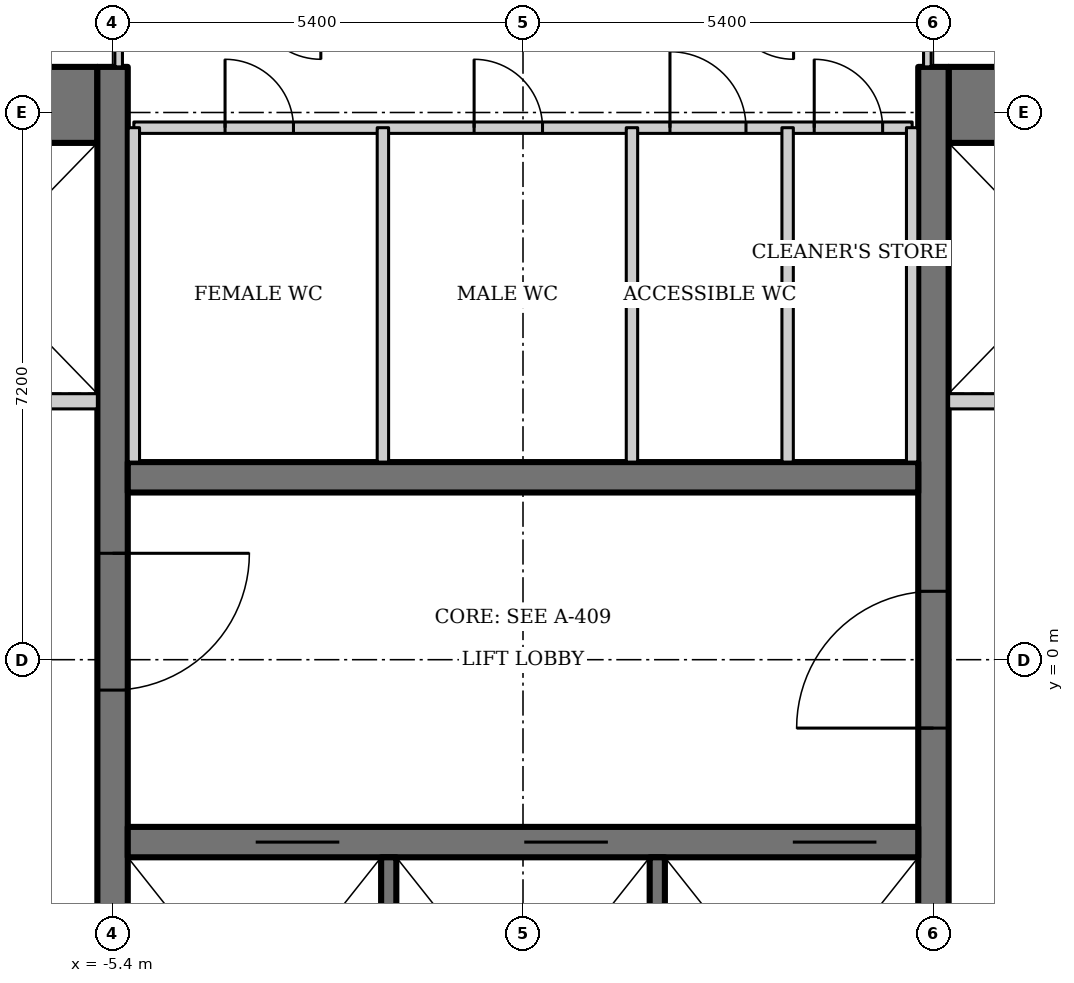
"""IFC4 building model, lengths in metres.
Left out: names, types, materials, properties, quantities, classifications, styles, units other than length and angle.
Written with IfcOpenShell. Run it as: python <this file> out.ifc"""

import sys

from ifc_helpers import new_model, si_unit, direction, frame, frame_2d, origin, place, context, subcontext, project, spatial, rectangle, extrude, element, fill, save


model = new_model("IFC4")
c1 = context("Model", 3, precision=1e-05, world=origin(), true_north=direction((0.0, 1.0)))
c2 = subcontext(c1, "Body", "Model", "MODEL_VIEW")
j1 = project(units=[si_unit("LENGTHUNIT", "METRE"), si_unit("PLANEANGLEUNIT", "RADIAN")], contexts=[c1])
p1 = place(None, origin())
s1 = spatial("IfcSite", under=j1, at=p1, CompositionType="ELEMENT")
p2 = place(p1, origin())
s2 = spatial("IfcBuilding", under=s1, at=p2, CompositionType="ELEMENT")
p3 = place(p2, frame((0.0, 0.0, 262.0)))
s3 = spatial("IfcBuildingStorey", under=s2, at=p3, CompositionType="ELEMENT", Elevation=262.0)
for number, where, z_axis, x_axis in (
    (1, (12.2, 7.3, 0.0), (0.0, 0.0, 1.0), (-1.0, 0.0, 0.0)),
    (2, (-5.6, 7.3, 0.0), (0.0, 0.0, 1.0), (-1.0, 0.0, 0.0)),
):
    element("IfcWall", number, at=place(p3, frame(where, z_axis=z_axis, x_axis=x_axis)), inside=s3, PredefinedType="SHEAR", context=c2, shape_type="SweptSolid", body=[
        extrude(rectangle(XDim=6.6, YDim=1.0, at=frame_2d((3.3, 0.0))), origin(), (0.0, 0.0, 1.0), 4.2),
    ])
p4 = place(p3, frame((5.4, -6.8, 0.0), z_axis=(0.0, 0.0, 1.0), x_axis=(0.0, 1.0, 0.0)))
e3 = element("IfcWall", 3, at=p4, inside=s3, PredefinedType="SHEAR", context=c2, shape_type="SweptSolid", body=[
    extrude(rectangle(XDim=14.6, YDim=0.4, at=frame_2d((7.3, 0.0))), origin(), (0.0, 0.0, 1.0), 4.2),
])
p5 = place(p4, frame((5.9, 0.0, 0.0)))
e4 = element("IfcOpeningElement", 4, at=p5, cuts=e3, PredefinedType="OPENING", context=c2, shape_type="SweptSolid", body=[
    extrude(rectangle(XDim=1.8, YDim=2.1, at=frame_2d((0.9, 1.05))), frame((0.0, 0.21, 0.0), z_axis=(0.0, -1.0, 0.0), x_axis=(1.0, 0.0, 0.0)), (0.0, 0.0, 1.0), 0.42),
])
p6 = place(p3, frame((-5.4, 7.8, 0.0), z_axis=(0.0, 0.0, 1.0), x_axis=(0.0, -1.0, 0.0)))
e5 = element("IfcWall", 5, at=p6, inside=s3, PredefinedType="SHEAR", context=c2, shape_type="SweptSolid", body=[
    extrude(rectangle(XDim=14.6, YDim=0.4, at=frame_2d((7.3, 0.0))), origin(), (0.0, 0.0, 1.0), 4.2),
])
p7 = place(p6, frame((6.4, 0.0, 0.0)))
e6 = element("IfcOpeningElement", 6, at=p7, cuts=e5, PredefinedType="OPENING", context=c2, shape_type="SweptSolid", body=[
    extrude(rectangle(XDim=1.8, YDim=2.1, at=frame_2d((0.9, 1.05))), frame((0.0, 0.21, 0.0), z_axis=(0.0, -1.0, 0.0), x_axis=(1.0, 0.0, 0.0)), (0.0, 0.0, 1.0), 0.42),
])
p8 = place(p3, frame((-5.2, -2.4, 0.0), z_axis=(0.0, 0.0, 1.0), x_axis=(1.0, 0.0, 0.0)))
e7 = element("IfcWall", 7, at=p8, inside=s3, PredefinedType="SHEAR", context=c2, shape_type="SweptSolid", body=[
    extrude(rectangle(XDim=10.4, YDim=0.4, at=frame_2d((5.2, 0.0))), origin(), (0.0, 0.0, 1.0), 4.2),
])
p9 = place(p8, frame((1.683, 0.0, 0.0)))
e8 = element("IfcOpeningElement", 8, at=p9, cuts=e7, PredefinedType="OPENING", context=c2, shape_type="SweptSolid", body=[
    extrude(rectangle(XDim=1.1, YDim=2.2, at=frame_2d((0.55, 1.1))), frame((0.0, 0.21, 0.0), z_axis=(0.0, -1.0, 0.0), x_axis=(1.0, 0.0, 0.0)), (0.0, 0.0, 1.0), 0.42),
])
p10 = place(p8, frame((5.217, 0.0, 0.0)))
e9 = element("IfcOpeningElement", 9, at=p10, cuts=e7, PredefinedType="OPENING", context=c2, shape_type="SweptSolid", body=[
    extrude(rectangle(XDim=1.1, YDim=2.2, at=frame_2d((0.55, 1.1))), frame((0.0, 0.21, 0.0), z_axis=(0.0, -1.0, 0.0), x_axis=(1.0, 0.0, 0.0)), (0.0, 0.0, 1.0), 0.42),
])
p11 = place(p8, frame((8.75, 0.0, 0.0)))
e10 = element("IfcOpeningElement", 10, at=p11, cuts=e7, PredefinedType="OPENING", context=c2, shape_type="SweptSolid", body=[
    extrude(rectangle(XDim=1.1, YDim=2.2, at=frame_2d((0.55, 1.1))), frame((0.0, 0.21, 0.0), z_axis=(0.0, -1.0, 0.0), x_axis=(1.0, 0.0, 0.0)), (0.0, 0.0, 1.0), 0.42),
])
for number, where, z_axis, x_axis in (
    (11, (-1.767, -2.6, 0.0), (0.0, 0.0, 1.0), (0.0, -1.0, 0.0)),
    (12, (1.767, -2.6, 0.0), (0.0, 0.0, 1.0), (0.0, -1.0, 0.0)),
):
    element("IfcWall", number, at=place(p3, frame(where, z_axis=z_axis, x_axis=x_axis)), inside=s3, PredefinedType="SOLIDWALL", context=c2, shape_type="SweptSolid", body=[
        extrude(rectangle(XDim=4.2, YDim=0.2, at=frame_2d((2.1, 0.0))), origin(), (0.0, 0.0, 1.0), 4.2),
    ])
p12 = place(p3, frame((5.2, 2.4, 0.0), z_axis=(0.0, 0.0, 1.0), x_axis=(-1.0, 0.0, 0.0)))
e13 = element("IfcWall", 13, at=p12, inside=s3, PredefinedType="SHEAR", context=c2, shape_type="SweptSolid", body=[
    extrude(rectangle(XDim=10.4, YDim=0.4, at=frame_2d((5.2, 0.0))), origin(), (0.0, 0.0, 1.0), 4.2),
])
p13 = place(p3, frame((12.2, 3.4, 0.0), z_axis=(0.0, 0.0, 1.0), x_axis=(-1.0, 0.0, 0.0)))
e14 = element("IfcWall", 14, at=p13, inside=s3, PredefinedType="SOLIDWALL", context=c2, shape_type="SweptSolid", body=[
    extrude(rectangle(XDim=6.6, YDim=0.2, at=frame_2d((3.3, 0.0))), origin(), (0.0, 0.0, 1.0), 4.2),
])
p14 = place(p13, frame((4.45, 0.0, 0.0)))
e15 = element("IfcOpeningElement", 15, at=p14, cuts=e14, PredefinedType="OPENING", context=c2, shape_type="SweptSolid", body=[
    extrude(rectangle(XDim=1.1, YDim=2.2, at=frame_2d((0.55, 1.1))), frame((0.0, 0.11, 0.0), z_axis=(0.0, -1.0, 0.0), x_axis=(1.0, 0.0, 0.0)), (0.0, 0.0, 1.0), 0.22),
])
p15 = place(p13, frame((0.9, 0.0, 0.0)))
e16 = element("IfcOpeningElement", 16, at=p15, cuts=e14, PredefinedType="OPENING", context=c2, shape_type="SweptSolid", body=[
    extrude(rectangle(XDim=1.4, YDim=2.2, at=frame_2d((0.7, 1.1))), frame((0.0, 0.11, 0.0), z_axis=(0.0, -1.0, 0.0), x_axis=(1.0, 0.0, 0.0)), (0.0, 0.0, 1.0), 0.22),
])
p16 = place(p3, frame((-12.2, 3.4, 0.0), z_axis=(0.0, 0.0, 1.0), x_axis=(1.0, 0.0, 0.0)))
e17 = element("IfcWall", 17, at=p16, inside=s3, PredefinedType="SOLIDWALL", context=c2, shape_type="SweptSolid", body=[
    extrude(rectangle(XDim=6.6, YDim=0.2, at=frame_2d((3.3, 0.0))), origin(), (0.0, 0.0, 1.0), 4.2),
])
p17 = place(p16, frame((1.05, 0.0, 0.0)))
e18 = element("IfcOpeningElement", 18, at=p17, cuts=e17, PredefinedType="OPENING", context=c2, shape_type="SweptSolid", body=[
    extrude(rectangle(XDim=1.1, YDim=2.2, at=frame_2d((0.55, 1.1))), frame((0.0, 0.11, 0.0), z_axis=(0.0, -1.0, 0.0), x_axis=(1.0, 0.0, 0.0)), (0.0, 0.0, 1.0), 0.22),
])
p18 = place(p16, frame((4.3, 0.0, 0.0)))
e19 = element("IfcOpeningElement", 19, at=p18, cuts=e17, PredefinedType="OPENING", context=c2, shape_type="SweptSolid", body=[
    extrude(rectangle(XDim=1.4, YDim=2.2, at=frame_2d((0.7, 1.1))), frame((0.0, 0.11, 0.0), z_axis=(0.0, -1.0, 0.0), x_axis=(1.0, 0.0, 0.0)), (0.0, 0.0, 1.0), 0.22),
])
p19 = place(p3, frame((-5.12, 7.0, 0.0), z_axis=(0.0, 0.0, 1.0), x_axis=(1.0, 0.0, 0.0)))
e20 = element("IfcWall", 20, at=p19, inside=s3, PredefinedType="SOLIDWALL", context=c2, shape_type="SweptSolid", body=[
    extrude(rectangle(XDim=10.24, YDim=0.15, at=frame_2d((5.12, 0.0))), origin(), (0.0, 0.0, 1.0), 4.05),
])
p20 = place(p19, frame((1.2, 0.0, 0.0)))
e21 = element("IfcOpeningElement", 21, at=p20, cuts=e20, PredefinedType="OPENING", context=c2, shape_type="SweptSolid", body=[
    extrude(rectangle(XDim=0.9, YDim=2.1, at=frame_2d((0.45, 1.05))), frame((0.0, 0.085, 0.0), z_axis=(0.0, -1.0, 0.0), x_axis=(1.0, 0.0, 0.0)), (0.0, 0.0, 1.0), 0.17),
])
p21 = place(p19, frame((4.477, 0.0, 0.0)))
e22 = element("IfcOpeningElement", 22, at=p21, cuts=e20, PredefinedType="OPENING", context=c2, shape_type="SweptSolid", body=[
    extrude(rectangle(XDim=0.9, YDim=2.1, at=frame_2d((0.45, 1.05))), frame((0.0, 0.085, 0.0), z_axis=(0.0, -1.0, 0.0), x_axis=(1.0, 0.0, 0.0)), (0.0, 0.0, 1.0), 0.17),
])
p22 = place(p19, frame((7.054, 0.0, 0.0)))
e23 = element("IfcOpeningElement", 23, at=p22, cuts=e20, PredefinedType="OPENING", context=c2, shape_type="SweptSolid", body=[
    extrude(rectangle(XDim=1.0, YDim=2.1, at=frame_2d((0.5, 1.05))), frame((0.0, 0.085, 0.0), z_axis=(0.0, -1.0, 0.0), x_axis=(1.0, 0.0, 0.0)), (0.0, 0.0, 1.0), 0.17),
])
p23 = place(p19, frame((8.952, 0.0, 0.0)))
e24 = element("IfcOpeningElement", 24, at=p23, cuts=e20, PredefinedType="OPENING", context=c2, shape_type="SweptSolid", body=[
    extrude(rectangle(XDim=0.9, YDim=2.1, at=frame_2d((0.45, 1.05))), frame((0.0, 0.085, 0.0), z_axis=(0.0, -1.0, 0.0), x_axis=(1.0, 0.0, 0.0)), (0.0, 0.0, 1.0), 0.17),
])
for number, where, z_axis, x_axis in (
    (25, (-5.12, 2.6, 0.0), (0.0, 0.0, 1.0), (0.0, 1.0, 0.0)),
    (26, (5.12, 2.6, 0.0), (0.0, 0.0, 1.0), (0.0, 1.0, 0.0)),
    (27, (-1.843, 2.6, 0.0), (0.0, 0.0, 1.0), (0.0, 1.0, 0.0)),
):
    element("IfcWall", number, at=place(p3, frame(where, z_axis=z_axis, x_axis=x_axis)), inside=s3, PredefinedType="SOLIDWALL", context=c2, shape_type="SweptSolid", body=[
        extrude(rectangle(XDim=4.4, YDim=0.15, at=frame_2d((2.2, 0.0))), origin(), (0.0, 0.0, 1.0), 4.05),
    ])
p24 = place(p3, frame((1.434, 2.6, 0.0), z_axis=(0.0, 0.0, 1.0), x_axis=(0.0, 1.0, 0.0)))
e28 = element("IfcWall", 28, at=p24, inside=s3, PredefinedType="SOLIDWALL", context=c2, shape_type="SweptSolid", body=[
    extrude(rectangle(XDim=4.4, YDim=0.15, at=frame_2d((2.2, 0.0))), origin(), (0.0, 0.0, 1.0), 3.108),
])
p25 = place(p3, frame((3.482, 2.6, 0.0), z_axis=(0.0, 0.0, 1.0), x_axis=(0.0, 1.0, 0.0)))
e29 = element("IfcWall", 29, at=p25, inside=s3, PredefinedType="SOLIDWALL", context=c2, shape_type="SweptSolid", body=[
    extrude(rectangle(XDim=4.4, YDim=0.15, at=frame_2d((2.2, 0.0))), origin(), (0.0, 0.0, 1.0), 4.05),
])
for number, where, z_axis, x_axis in (
    (30, (5.32, 7.8, 0.0), (0.0, 0.0, 1.0), (0.0, 1.0, 0.0)),
    (31, (-5.32, 8.8, 0.0), (0.0, 0.0, 1.0), (0.0, -1.0, 0.0)),
):
    element("IfcWall", number, at=place(p3, frame(where, z_axis=z_axis, x_axis=x_axis)), inside=s3, PredefinedType="PARTITIONING", context=c2, shape_type="SweptSolid", body=[
        extrude(rectangle(XDim=1.0, YDim=0.1, at=frame_2d((0.5, 0.0))), origin(), (0.0, 0.0, 1.0), 4.05),
    ])
p26 = place(p5, origin())
e32 = element("IfcDoor", 32, at=p26, inside=s3, OperationType="DOUBLE_DOOR_DOUBLE_SWING", PredefinedType="DOOR", context=c2, shape_type="SweptSolid", body=[
    extrude(rectangle(XDim=1.8, YDim=2.1, at=frame_2d((0.9, 1.05))), frame((0.0, 0.025, 0.0), z_axis=(0.0, -1.0, 0.0), x_axis=(1.0, 0.0, 0.0)), (0.0, 0.0, 1.0), 0.05),
])
fill(e4, e32)
p27 = place(p7, origin())
e33 = element("IfcDoor", 33, at=p27, inside=s3, OperationType="DOUBLE_DOOR_DOUBLE_SWING", PredefinedType="DOOR", context=c2, shape_type="SweptSolid", body=[
    extrude(rectangle(XDim=1.8, YDim=2.1, at=frame_2d((0.9, 1.05))), frame((0.0, 0.025, 0.0), z_axis=(0.0, -1.0, 0.0), x_axis=(1.0, 0.0, 0.0)), (0.0, 0.0, 1.0), 0.05),
])
fill(e6, e33)
p28 = place(p9, origin())
e34 = element("IfcDoor", 34, at=p28, inside=s3, OperationType="DOUBLE_DOOR_SLIDING", PredefinedType="DOOR", context=c2, shape_type="SweptSolid", body=[
    extrude(rectangle(XDim=1.1, YDim=2.2, at=frame_2d((0.55, 1.1))), frame((0.0, 0.025, 0.0), z_axis=(0.0, -1.0, 0.0), x_axis=(1.0, 0.0, 0.0)), (0.0, 0.0, 1.0), 0.05),
])
fill(e8, e34)
p29 = place(p10, origin())
e35 = element("IfcDoor", 35, at=p29, inside=s3, OperationType="DOUBLE_DOOR_SLIDING", PredefinedType="DOOR", context=c2, shape_type="SweptSolid", body=[
    extrude(rectangle(XDim=1.1, YDim=2.2, at=frame_2d((0.55, 1.1))), frame((0.0, 0.025, 0.0), z_axis=(0.0, -1.0, 0.0), x_axis=(1.0, 0.0, 0.0)), (0.0, 0.0, 1.0), 0.05),
])
fill(e9, e35)
p30 = place(p11, origin())
e36 = element("IfcDoor", 36, at=p30, inside=s3, OperationType="DOUBLE_DOOR_SLIDING", PredefinedType="DOOR", context=c2, shape_type="SweptSolid", body=[
    extrude(rectangle(XDim=1.1, YDim=2.2, at=frame_2d((0.55, 1.1))), frame((0.0, 0.025, 0.0), z_axis=(0.0, -1.0, 0.0), x_axis=(1.0, 0.0, 0.0)), (0.0, 0.0, 1.0), 0.05),
])
fill(e10, e36)
p31 = place(p20, origin())
e37 = element("IfcDoor", 37, at=p31, inside=s3, OperationType="SINGLE_SWING_LEFT", PredefinedType="DOOR", context=c2, shape_type="SweptSolid", body=[
    extrude(rectangle(XDim=0.9, YDim=2.1, at=frame_2d((0.45, 1.05))), frame((0.0, 0.025, 0.0), z_axis=(0.0, -1.0, 0.0), x_axis=(1.0, 0.0, 0.0)), (0.0, 0.0, 1.0), 0.05),
])
fill(e21, e37)
p32 = place(p21, origin())
e38 = element("IfcDoor", 38, at=p32, inside=s3, OperationType="SINGLE_SWING_LEFT", PredefinedType="DOOR", context=c2, shape_type="SweptSolid", body=[
    extrude(rectangle(XDim=0.9, YDim=2.1, at=frame_2d((0.45, 1.05))), frame((0.0, 0.025, 0.0), z_axis=(0.0, -1.0, 0.0), x_axis=(1.0, 0.0, 0.0)), (0.0, 0.0, 1.0), 0.05),
])
fill(e22, e38)
p33 = place(p22, origin())
e39 = element("IfcDoor", 39, at=p33, inside=s3, OperationType="SINGLE_SWING_LEFT", PredefinedType="DOOR", context=c2, shape_type="SweptSolid", body=[
    extrude(rectangle(XDim=1.0, YDim=2.1, at=frame_2d((0.5, 1.05))), frame((0.0, 0.025, 0.0), z_axis=(0.0, -1.0, 0.0), x_axis=(1.0, 0.0, 0.0)), (0.0, 0.0, 1.0), 0.05),
])
fill(e23, e39)
p34 = place(p23, origin())
e40 = element("IfcDoor", 40, at=p34, inside=s3, OperationType="SINGLE_SWING_LEFT", PredefinedType="DOOR", context=c2, shape_type="SweptSolid", body=[
    extrude(rectangle(XDim=0.9, YDim=2.1, at=frame_2d((0.45, 1.05))), frame((0.0, 0.025, 0.0), z_axis=(0.0, -1.0, 0.0), x_axis=(1.0, 0.0, 0.0)), (0.0, 0.0, 1.0), 0.05),
])
fill(e24, e40)
save(model, sys.argv[1])
